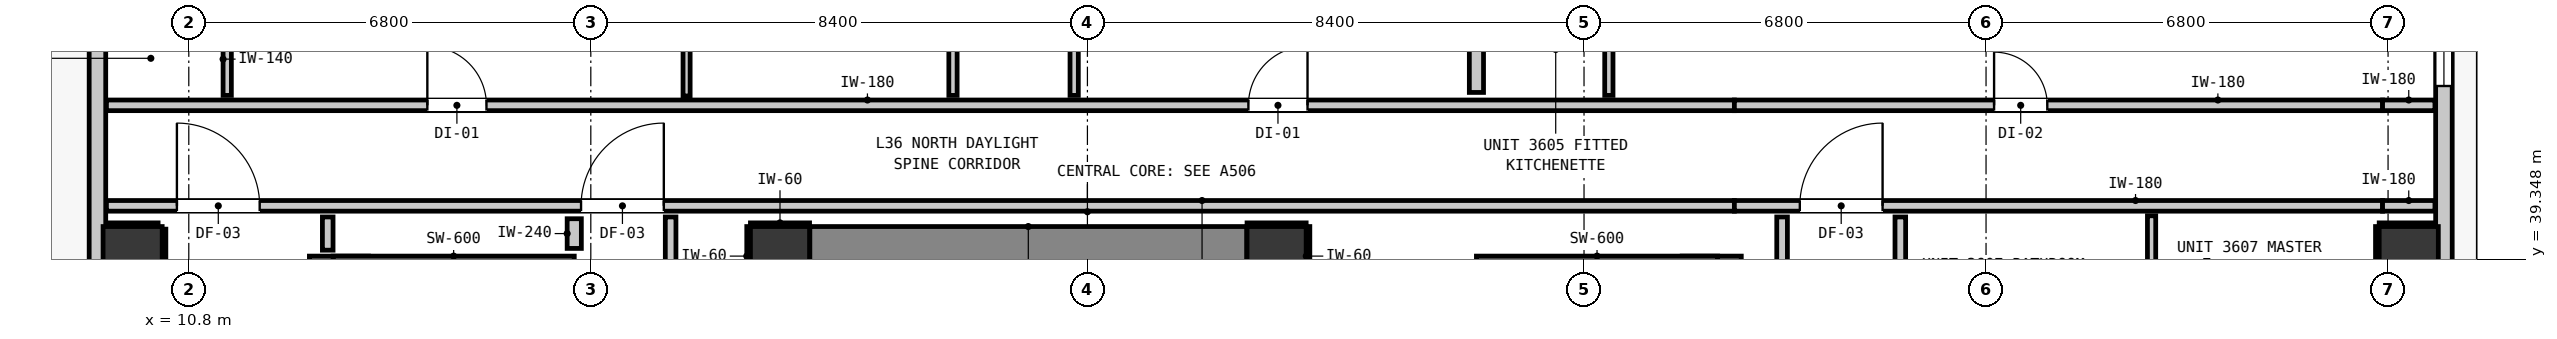
"""IFC4 building model, lengths in metres.
Left out: names, types, materials, properties, quantities, classifications, styles, units other than length and angle.
Written with IfcOpenShell. Run it as: python <this file> out.ifc"""

import sys

from ifc_helpers import new_model, si_unit, direction, frame, frame_2d, origin, origin_2d, place, context, subcontext, project, spatial, rectangle, extrude, element, fill, save


model = new_model("IFC4")
c1 = context("Model", 3, precision=1e-05, world=origin(), true_north=direction((0.0, 1.0)))
c2 = subcontext(c1, "Body", "Model", "MODEL_VIEW")
j1 = project(units=[si_unit("LENGTHUNIT", "METRE"), si_unit("PLANEANGLEUNIT", "RADIAN")], contexts=[c1])
p1 = place(None, origin())
s1 = spatial("IfcSite", under=j1, at=p1, CompositionType="ELEMENT")
p2 = place(p1, origin())
s2 = spatial("IfcBuilding", under=s1, at=p2, CompositionType="ELEMENT")
p3 = place(p2, frame((0.0, 0.0, 126.0)))
s3 = spatial("IfcBuildingStorey", under=s2, at=p3, CompositionType="ELEMENT", Elevation=126.0)
for number, where, z_axis, x_axis in (
    (1, (20.8, 39.4, 0.0), (0.0, 0.0, 1.0), (1.0, 0.0, 0.0)),
    (2, (29.2, 39.4, 0.0), (0.0, 0.0, 1.0), (1.0, 0.0, 0.0)),
):
    element("IfcColumn", number, at=place(p3, frame(where, z_axis=z_axis, x_axis=x_axis)), inside=s3, PredefinedType="COLUMN", context=c2, shape_type="SweptSolid", body=[
        extrude(rectangle(XDim=1.0, YDim=1.0, at=origin_2d()), origin(), (0.0, 0.0, 1.0), 3.32),
    ])
p4 = place(p3, frame((13.34, 31.205, 0.0), z_axis=(0.0, 0.0, 1.0), x_axis=(0.0, 1.0, 0.0)))
e3 = element("IfcWall", 3, at=p4, inside=s3, PredefinedType="SHEAR", context=c2, shape_type="SweptSolid", body=[
    extrude(rectangle(XDim=8.195, YDim=1.0, at=frame_2d((4.097, 0.0))), origin(), (0.0, 0.0, 1.0), 3.32),
])
p5 = place(p3, frame((13.24, 39.1, 0.0), z_axis=(0.0, 0.0, 1.0), x_axis=(1.0, 0.0, 0.0)))
e4 = element("IfcWall", 4, at=p5, inside=s3, PredefinedType="SHEAR", context=c2, shape_type="SweptSolid", body=[
    extrude(rectangle(XDim=4.08, YDim=0.6, at=frame_2d((2.04, 0.0))), origin(), (0.0, 0.0, 1.0), 3.32),
])
p6 = place(p3, frame((36.56, 31.205, 0.0), z_axis=(0.0, 0.0, 1.0), x_axis=(0.0, 1.0, 0.0)))
e5 = element("IfcWall", 5, at=p6, inside=s3, PredefinedType="SHEAR", context=c2, shape_type="SweptSolid", body=[
    extrude(rectangle(XDim=8.195, YDim=1.0, at=frame_2d((4.097, 0.0))), origin(), (0.0, 0.0, 1.0), 3.32),
])
p7 = place(p3, frame((32.58, 39.1, 0.0), z_axis=(0.0, 0.0, 1.0), x_axis=(1.0, 0.0, 0.0)))
e6 = element("IfcWall", 6, at=p7, inside=s3, PredefinedType="SHEAR", context=c2, shape_type="SweptSolid", body=[
    extrude(rectangle(XDim=4.08, YDim=0.6, at=frame_2d((2.04, 0.0))), origin(), (0.0, 0.0, 1.0), 3.32),
])
p8 = place(p3, frame((21.305, 39.4, 0.0), z_axis=(0.0, 0.0, 1.0), x_axis=(1.0, 0.0, 0.0)))
e7 = element("IfcWall", 7, at=p8, inside=s3, PredefinedType="SHEAR", context=c2, shape_type="SweptSolid", body=[
    extrude(rectangle(XDim=7.39, YDim=1.0, at=frame_2d((3.695, 0.0))), origin(), (0.0, 0.0, 1.0), 3.32),
])
for number, where, z_axis, x_axis in (
    (8, (9.85, 39.4, -0.2), (0.0, 0.0, 1.0), (1.0, 0.0, 0.0)),
    (9, (48.35, 39.4, -0.2), (0.0, 0.0, 1.0), (1.0, 0.0, 0.0)),
):
    element("IfcColumn", number, at=place(p3, frame(where, z_axis=z_axis, x_axis=x_axis)), inside=s3, PredefinedType="COLUMN", context=c2, shape_type="SweptSolid", body=[
        extrude(rectangle(XDim=1.0, YDim=1.0, at=origin_2d()), origin(), (0.0, 0.0, 1.0), 3.52),
    ])
p9 = place(p3, frame((9.255, 11.355, 0.0), z_axis=(0.0, 0.0, 1.0), x_axis=(0.0, 1.0, 0.0)))
e10 = element("IfcWall", 10, at=p9, inside=s3, PredefinedType="STANDARD", context=c2, shape_type="SweptSolid", body=[
    extrude(rectangle(XDim=32.29, YDim=0.28, at=frame_2d((16.145, 0.0))), origin(), (0.0, 0.0, 1.0), 3.08),
])
p10 = place(p9, frame((0.503, 0.0, 0.0)))
e11 = element("IfcOpeningElement", 11, at=p10, cuts=e10, PredefinedType="OPENING", context=c2, shape_type="SweptSolid", body=[
    extrude(rectangle(XDim=1.1, YDim=2.15, at=frame_2d((0.55, 1.075))), frame((0.0, 0.15, 0.0), z_axis=(0.0, -1.0, 0.0), x_axis=(1.0, 0.0, 0.0)), (0.0, 0.0, 1.0), 0.3),
])
p11 = place(p3, frame((48.945, 43.645, 0.0), z_axis=(0.0, 0.0, 1.0), x_axis=(0.0, -1.0, 0.0)))
e12 = element("IfcWall", 12, at=p11, inside=s3, PredefinedType="STANDARD", context=c2, shape_type="SweptSolid", body=[
    extrude(rectangle(XDim=32.29, YDim=0.28, at=frame_2d((16.145, 0.0))), origin(), (0.0, 0.0, 1.0), 3.08),
])
p12 = place(p11, frame((6.52, 0.0, 0.0)))
e13 = element("IfcOpeningElement", 13, at=p12, cuts=e12, PredefinedType="OPENING", context=c2, shape_type="SweptSolid", body=[
    extrude(rectangle(XDim=1.0, YDim=2.15, at=frame_2d((0.5, 1.075))), frame((0.0, 0.15, 0.0), z_axis=(0.0, -1.0, 0.0), x_axis=(1.0, 0.0, 0.0)), (0.0, 0.0, 1.0), 0.3),
])
p13 = place(p11, frame((0.318, 0.0, 0.85)))
e14 = element("IfcOpeningElement", 14, at=p13, cuts=e12, PredefinedType="OPENING", context=c2, shape_type="SweptSolid", body=[
    extrude(rectangle(XDim=1.05, YDim=1.65, at=frame_2d((0.525, 0.825))), frame((0.0, 0.15, 0.0), z_axis=(0.0, -1.0, 0.0), x_axis=(1.0, 0.0, 0.0)), (0.0, 0.0, 1.0), 0.3),
])
p14 = place(p11, frame((16.674, 0.0, 0.85)))
e15 = element("IfcOpeningElement", 15, at=p14, cuts=e12, PredefinedType="OPENING", context=c2, shape_type="SweptSolid", body=[
    extrude(rectangle(XDim=1.5, YDim=1.8, at=frame_2d((0.75, 0.9))), frame((0.0, 0.15, 0.0), z_axis=(0.0, -1.0, 0.0), x_axis=(1.0, 0.0, 0.0)), (0.0, 0.0, 1.0), 0.3),
])
p15 = place(p11, frame((13.773, 0.0, 0.85)))
e16 = element("IfcOpeningElement", 16, at=p15, cuts=e12, PredefinedType="OPENING", context=c2, shape_type="SweptSolid", body=[
    extrude(rectangle(XDim=1.05, YDim=1.65, at=frame_2d((0.525, 0.825))), frame((0.0, 0.15, 0.0), z_axis=(0.0, -1.0, 0.0), x_axis=(1.0, 0.0, 0.0)), (0.0, 0.0, 1.0), 0.3),
])
p16 = place(p11, frame((7.907, 0.0, 0.85)))
e17 = element("IfcOpeningElement", 17, at=p16, cuts=e12, PredefinedType="OPENING", context=c2, shape_type="SweptSolid", body=[
    extrude(rectangle(XDim=1.5, YDim=1.8, at=frame_2d((0.75, 0.9))), frame((0.0, 0.15, 0.0), z_axis=(0.0, -1.0, 0.0), x_axis=(1.0, 0.0, 0.0)), (0.0, 0.0, 1.0), 0.3),
])
p17 = place(p11, frame((5.043, 0.0, 0.85)))
e18 = element("IfcOpeningElement", 18, at=p17, cuts=e12, PredefinedType="OPENING", context=c2, shape_type="SweptSolid", body=[
    extrude(rectangle(XDim=0.58, YDim=1.5, at=frame_2d((0.29, 0.75))), frame((0.0, 0.15, 0.0), z_axis=(0.0, -1.0, 0.0), x_axis=(1.0, 0.0, 0.0)), (0.0, 0.0, 1.0), 0.3),
])
p18 = place(p3, frame((9.407, 40.25, 0.0), z_axis=(0.0, 0.0, 1.0), x_axis=(1.0, 0.0, 0.0)))
e19 = element("IfcWall", 19, at=p18, inside=s3, PredefinedType="PARTITIONING", context=c2, shape_type="SweptSolid", body=[
    extrude(rectangle(XDim=27.536, YDim=0.18, at=frame_2d((13.768, 0.0))), origin(), (0.0, 0.0, 1.0), 3.08),
])
p19 = place(p18, frame((8.028, 0.0, 0.0)))
e20 = element("IfcOpeningElement", 20, at=p19, cuts=e19, PredefinedType="OPENING", context=c2, shape_type="SweptSolid", body=[
    extrude(rectangle(XDim=1.4, YDim=2.15, at=frame_2d((0.7, 1.075))), frame((0.0, 0.1, 0.0), z_axis=(0.0, -1.0, 0.0), x_axis=(1.0, 0.0, 0.0)), (0.0, 0.0, 1.0), 0.2),
])
p20 = place(p18, frame((1.192, 0.0, 0.0)))
e21 = element("IfcOpeningElement", 21, at=p20, cuts=e19, PredefinedType="OPENING", context=c2, shape_type="SweptSolid", body=[
    extrude(rectangle(XDim=1.4, YDim=2.15, at=frame_2d((0.7, 1.075))), frame((0.0, 0.1, 0.0), z_axis=(0.0, -1.0, 0.0), x_axis=(1.0, 0.0, 0.0)), (0.0, 0.0, 1.0), 0.2),
])
p21 = place(p3, frame((36.943, 40.25, 0.0), z_axis=(0.0, 0.0, 1.0), x_axis=(1.0, 0.0, 0.0)))
e22 = element("IfcWall", 22, at=p21, inside=s3, PredefinedType="PARTITIONING", context=c2, shape_type="SweptSolid", body=[
    extrude(rectangle(XDim=10.964, YDim=0.18, at=frame_2d((5.482, 0.0))), origin(), (0.0, 0.0, 1.0), 2.565),
])
p22 = place(p21, frame((1.107, 0.0, 0.0)))
e23 = element("IfcOpeningElement", 23, at=p22, cuts=e22, PredefinedType="OPENING", context=c2, shape_type="SweptSolid", body=[
    extrude(rectangle(XDim=1.4, YDim=2.15, at=frame_2d((0.7, 1.075))), frame((0.0, 0.1, 0.0), z_axis=(0.0, -1.0, 0.0), x_axis=(1.0, 0.0, 0.0)), (0.0, 0.0, 1.0), 0.2),
])
p23 = place(p3, frame((47.907, 40.25, 0.0), z_axis=(0.0, 0.0, 1.0), x_axis=(1.0, 0.0, 0.0)))
e24 = element("IfcWall", 24, at=p23, inside=s3, PredefinedType="PARTITIONING", context=c2, shape_type="SweptSolid", body=[
    extrude(rectangle(XDim=0.886, YDim=0.18, at=frame_2d((0.443, 0.0))), origin(), (0.0, 0.0, 1.0), 3.08),
])
p24 = place(p3, frame((9.407, 41.95, 0.0), z_axis=(0.0, 0.0, 1.0), x_axis=(1.0, 0.0, 0.0)))
e25 = element("IfcWall", 25, at=p24, inside=s3, PredefinedType="PARTITIONING", context=c2, shape_type="SweptSolid", body=[
    extrude(rectangle(XDim=27.536, YDim=0.18, at=frame_2d((13.768, 0.0))), origin(), (0.0, 0.0, 1.0), 3.08),
])
p25 = place(p24, frame((5.428, 0.0, 0.0)))
e26 = element("IfcOpeningElement", 26, at=p25, cuts=e25, PredefinedType="OPENING", context=c2, shape_type="SweptSolid", body=[
    extrude(rectangle(XDim=1.0, YDim=2.15, at=frame_2d((0.5, 1.075))), frame((0.0, 0.1, 0.0), z_axis=(0.0, -1.0, 0.0), x_axis=(1.0, 0.0, 0.0)), (0.0, 0.0, 1.0), 0.2),
])
p26 = place(p24, frame((19.316, 0.0, 0.0)))
e27 = element("IfcOpeningElement", 27, at=p26, cuts=e25, PredefinedType="OPENING", context=c2, shape_type="SweptSolid", body=[
    extrude(rectangle(XDim=1.0, YDim=2.15, at=frame_2d((0.5, 1.075))), frame((0.0, 0.1, 0.0), z_axis=(0.0, -1.0, 0.0), x_axis=(1.0, 0.0, 0.0)), (0.0, 0.0, 1.0), 0.2),
])
p27 = place(p3, frame((36.943, 41.95, 0.0), z_axis=(0.0, 0.0, 1.0), x_axis=(1.0, 0.0, 0.0)))
e28 = element("IfcWall", 28, at=p27, inside=s3, PredefinedType="PARTITIONING", context=c2, shape_type="SweptSolid", body=[
    extrude(rectangle(XDim=10.964, YDim=0.18, at=frame_2d((5.482, 0.0))), origin(), (0.0, 0.0, 1.0), 2.565),
])
p28 = place(p27, frame((4.393, 0.0, 0.0)))
e29 = element("IfcOpeningElement", 29, at=p28, cuts=e28, PredefinedType="OPENING", context=c2, shape_type="SweptSolid", body=[
    extrude(rectangle(XDim=0.9, YDim=2.1, at=frame_2d((0.45, 1.05))), frame((0.0, 0.1, 0.0), z_axis=(0.0, -1.0, 0.0), x_axis=(1.0, 0.0, 0.0)), (0.0, 0.0, 1.0), 0.2),
])
p29 = place(p3, frame((47.907, 41.95, 0.0), z_axis=(0.0, 0.0, 1.0), x_axis=(1.0, 0.0, 0.0)))
e30 = element("IfcWall", 30, at=p29, inside=s3, PredefinedType="PARTITIONING", context=c2, shape_type="SweptSolid", body=[
    extrude(rectangle(XDim=0.886, YDim=0.18, at=frame_2d((0.443, 0.0))), origin(), (0.0, 0.0, 1.0), 3.08),
])
p30 = place(p3, frame((17.32, 39.53, 0.0), z_axis=(0.0, 0.0, 1.0), x_axis=(0.0, 1.0, 0.0)))
e31 = element("IfcWall", 31, at=p30, inside=s3, PredefinedType="PARTITIONING", context=c2, shape_type="SweptSolid", body=[
    extrude(rectangle(XDim=0.502, YDim=0.24, at=frame_2d((0.251, 0.0))), origin(), (0.0, 0.0, 1.0), 3.08),
])
p31 = place(p3, frame((32.58, 42.168, 0.0), z_axis=(0.0, 0.0, 1.0), x_axis=(0.0, 1.0, 0.0)))
e32 = element("IfcWall", 32, at=p31, inside=s3, PredefinedType="PARTITIONING", context=c2, shape_type="SweptSolid", body=[
    extrude(rectangle(XDim=3.625, YDim=0.24, at=frame_2d((1.812, 0.0))), origin(), (0.0, 0.0, 1.0), 3.08),
])
p32 = place(p31, frame((1.257, 0.0, 0.0)))
e33 = element("IfcOpeningElement", 33, at=p32, cuts=e32, PredefinedType="OPENING", context=c2, shape_type="SweptSolid", body=[
    extrude(rectangle(XDim=0.9, YDim=2.1, at=frame_2d((0.45, 1.05))), frame((0.0, 0.13, 0.0), z_axis=(0.0, -1.0, 0.0), x_axis=(1.0, 0.0, 0.0)), (0.0, 0.0, 1.0), 0.26),
])
p33 = place(p3, frame((13.15, 39.5, 0.0), z_axis=(0.0, 0.0, 1.0), x_axis=(0.0, 1.0, 0.0)))
e34 = element("IfcWall", 34, at=p33, inside=s3, PredefinedType="PARTITIONING", context=c2, shape_type="SweptSolid", body=[
    extrude(rectangle(XDim=0.562, YDim=0.18, at=frame_2d((0.281, 0.0))), origin(), (0.0, 0.0, 1.0), 2.315),
])
p34 = place(p3, frame((18.95, 39.058, 0.0), z_axis=(0.0, 0.0, 1.0), x_axis=(0.0, 1.0, 0.0)))
e35 = element("IfcWall", 35, at=p34, inside=s3, PredefinedType="PARTITIONING", context=c2, shape_type="SweptSolid", body=[
    extrude(rectangle(XDim=1.004, YDim=0.18, at=frame_2d((0.502, 0.0))), origin(), (0.0, 0.0, 1.0), 3.08),
])
p35 = place(p3, frame((37.75, 21.368, 0.0), z_axis=(0.0, 0.0, 1.0), x_axis=(0.0, 1.0, 0.0)))
e36 = element("IfcWall", 36, at=p35, inside=s3, PredefinedType="PARTITIONING", context=c2, shape_type="SweptSolid", body=[
    extrude(rectangle(XDim=18.694, YDim=0.18, at=frame_2d((9.347, 0.0))), origin(), (0.0, 0.0, 1.0), 3.08),
])
p36 = place(p3, frame((39.75, 37.793, 0.0), z_axis=(0.0, 0.0, 1.0), x_axis=(0.0, 1.0, 0.0)))
e37 = element("IfcWall", 37, at=p36, inside=s3, PredefinedType="PARTITIONING", context=c2, shape_type="SweptSolid", body=[
    extrude(rectangle(XDim=2.269, YDim=0.18, at=frame_2d((1.135, 0.0))), origin(), (0.0, 0.0, 1.0), 3.08),
])
p37 = place(p3, frame((11.45, 42.118, 0.0), z_axis=(0.0, 0.0, 1.0), x_axis=(0.0, 1.0, 0.0)))
e38 = element("IfcWall", 38, at=p37, inside=s3, PredefinedType="PARTITIONING", context=c2, shape_type="SweptSolid", body=[
    extrude(rectangle(XDim=2.808, YDim=0.14, at=frame_2d((1.404, 0.0))), origin(), (0.0, 0.0, 1.0), 2.565),
])
p38 = place(p37, frame((1.327, 0.0, 0.0)))
e39 = element("IfcOpeningElement", 39, at=p38, cuts=e38, PredefinedType="OPENING", context=c2, shape_type="SweptSolid", body=[
    extrude(rectangle(XDim=0.86, YDim=2.02, at=frame_2d((0.43, 1.01))), frame((0.0, 0.08, 0.0), z_axis=(0.0, -1.0, 0.0), x_axis=(1.0, 0.0, 0.0)), (0.0, 0.0, 1.0), 0.16),
])
p39 = place(p3, frame((23.726, 42.118, 0.0), z_axis=(0.0, 0.0, 1.0), x_axis=(0.0, 1.0, 0.0)))
e40 = element("IfcWall", 40, at=p39, inside=s3, PredefinedType="PARTITIONING", context=c2, shape_type="SweptSolid", body=[
    extrude(rectangle(XDim=3.675, YDim=0.14, at=frame_2d((1.837, 0.0))), origin(), (0.0, 0.0, 1.0), 3.08),
])
p40 = place(p3, frame((25.776, 42.118, 0.0), z_axis=(0.0, 0.0, 1.0), x_axis=(0.0, 1.0, 0.0)))
e41 = element("IfcWall", 41, at=p40, inside=s3, PredefinedType="PARTITIONING", context=c2, shape_type="SweptSolid", body=[
    extrude(rectangle(XDim=3.675, YDim=0.14, at=frame_2d((1.837, 0.0))), origin(), (0.0, 0.0, 1.0), 3.08),
])
p41 = place(p40, frame((1.327, 0.0, 0.0)))
e42 = element("IfcOpeningElement", 42, at=p41, cuts=e41, PredefinedType="OPENING", context=c2, shape_type="SweptSolid", body=[
    extrude(rectangle(XDim=0.86, YDim=2.02, at=frame_2d((0.43, 1.01))), frame((0.0, 0.08, 0.0), z_axis=(0.0, -1.0, 0.0), x_axis=(1.0, 0.0, 0.0)), (0.0, 0.0, 1.0), 0.16),
])
p42 = place(p3, frame((34.82, 42.118, 0.0), z_axis=(0.0, 0.0, 1.0), x_axis=(0.0, 1.0, 0.0)))
e43 = element("IfcWall", 43, at=p42, inside=s3, PredefinedType="PARTITIONING", context=c2, shape_type="SweptSolid", body=[
    extrude(rectangle(XDim=3.675, YDim=0.14, at=frame_2d((1.837, 0.0))), origin(), (0.0, 0.0, 1.0), 3.08),
])
p43 = place(p3, frame((44.0, 37.773, 0.0), z_axis=(0.0, 0.0, 1.0), x_axis=(0.0, 1.0, 0.0)))
e44 = element("IfcWall", 44, at=p43, inside=s3, PredefinedType="PARTITIONING", context=c2, shape_type="SweptSolid", body=[
    extrude(rectangle(XDim=2.309, YDim=0.14, at=frame_2d((1.155, 0.0))), origin(), (0.0, 0.0, 1.0), 3.08),
])
p44 = place(p3, frame((19.22, 42.108, 0.0), z_axis=(0.0, 0.0, 1.0), x_axis=(0.0, 1.0, 0.0)))
e45 = element("IfcWall", 45, at=p44, inside=s3, PredefinedType="PARTITIONING", context=c2, shape_type="SweptSolid", body=[
    extrude(rectangle(XDim=3.685, YDim=0.12, at=frame_2d((1.843, 0.0))), origin(), (0.0, 0.0, 1.0), 3.08),
])
p45 = place(p44, frame((1.317, 0.0, 0.0)))
e46 = element("IfcOpeningElement", 46, at=p45, cuts=e45, PredefinedType="OPENING", context=c2, shape_type="SweptSolid", body=[
    extrude(rectangle(XDim=0.9, YDim=2.1, at=frame_2d((0.45, 1.05))), frame((0.0, 0.07, 0.0), z_axis=(0.0, -1.0, 0.0), x_axis=(1.0, 0.0, 0.0)), (0.0, 0.0, 1.0), 0.14),
])
for number, where, z_axis, x_axis in (
    (47, (20.3, 39.932, 0.0), (0.0, 0.0, 1.0), (1.0, 0.0, 0.0)),
    (48, (20.268, 38.9, 0.0), (0.0, 0.0, 1.0), (0.0, 1.0, 0.0)),
    (49, (28.7, 39.932, 0.0), (0.0, 0.0, 1.0), (1.0, 0.0, 0.0)),
    (50, (29.732, 38.9, 0.0), (0.0, 0.0, 1.0), (0.0, 1.0, 0.0)),
):
    element("IfcWall", number, at=place(p3, frame(where, z_axis=z_axis, x_axis=x_axis)), inside=s3, PredefinedType="PARTITIONING", context=c2, shape_type="SweptSolid", body=[
        extrude(rectangle(XDim=1.0, YDim=0.06, at=frame_2d((0.5, 0.0))), origin(), (0.0, 0.0, 1.0), 1.45),
    ])
p46 = place(p3, frame((9.41, 39.932, 0.0), z_axis=(0.0, 0.0, 1.0), x_axis=(1.0, 0.0, 0.0)))
e51 = element("IfcWall", 51, at=p46, inside=s3, PredefinedType="PARTITIONING", context=c2, shape_type="SweptSolid", body=[
    extrude(rectangle(XDim=0.871, YDim=0.06, at=frame_2d((0.436, 0.0))), origin(), (0.0, 0.0, 1.0), 1.45),
])
p47 = place(p3, frame((10.382, 38.9, 0.0), z_axis=(0.0, 0.0, 1.0), x_axis=(0.0, 1.0, 0.0)))
e52 = element("IfcWall", 52, at=p47, inside=s3, PredefinedType="PARTITIONING", context=c2, shape_type="SweptSolid", body=[
    extrude(rectangle(XDim=0.956, YDim=0.06, at=frame_2d((0.478, 0.0))), origin(), (0.0, 0.0, 1.0), 1.45),
])
p48 = place(p3, frame((47.85, 39.932, 0.0), z_axis=(0.0, 0.0, 1.0), x_axis=(1.0, 0.0, 0.0)))
e53 = element("IfcWall", 53, at=p48, inside=s3, PredefinedType="PARTITIONING", context=c2, shape_type="SweptSolid", body=[
    extrude(rectangle(XDim=0.94, YDim=0.06, at=frame_2d((0.47, 0.0))), origin(), (0.0, 0.0, 1.0), 1.45),
])
p49 = place(p3, frame((47.818, 38.9, 0.0), z_axis=(0.0, 0.0, 1.0), x_axis=(0.0, 1.0, 0.0)))
e54 = element("IfcWall", 54, at=p49, inside=s3, PredefinedType="PARTITIONING", context=c2, shape_type="SweptSolid", body=[
    extrude(rectangle(XDim=1.0, YDim=0.06, at=frame_2d((0.5, 0.0))), origin(), (0.0, 0.0, 1.0), 1.45),
])
p50 = place(p13, origin())
e55 = element("IfcWindow", 55, at=p50, inside=s3, PartitioningType="SINGLE_PANEL", PredefinedType="WINDOW", context=c2, shape_type="SweptSolid", body=[
    extrude(rectangle(XDim=1.05, YDim=1.65, at=frame_2d((0.525, 0.825))), frame((0.0, 0.03, 0.0), z_axis=(0.0, -1.0, 0.0), x_axis=(1.0, 0.0, 0.0)), (0.0, 0.0, 1.0), 0.06),
])
fill(e14, e55)
p51 = place(p19, origin())
e56 = element("IfcDoor", 56, at=p51, inside=s3, OperationType="SINGLE_SWING_RIGHT", PredefinedType="DOOR", context=c2, shape_type="SweptSolid", body=[
    extrude(rectangle(XDim=1.4, YDim=2.15, at=frame_2d((0.7, 1.075))), frame((0.0, 0.025, 0.0), z_axis=(0.0, -1.0, 0.0), x_axis=(1.0, 0.0, 0.0)), (0.0, 0.0, 1.0), 0.05),
])
fill(e20, e56)
p52 = place(p20, origin())
e57 = element("IfcDoor", 57, at=p52, inside=s3, OperationType="SINGLE_SWING_LEFT", PredefinedType="DOOR", context=c2, shape_type="SweptSolid", body=[
    extrude(rectangle(XDim=1.4, YDim=2.15, at=frame_2d((0.7, 1.075))), frame((0.0, 0.025, 0.0), z_axis=(0.0, -1.0, 0.0), x_axis=(1.0, 0.0, 0.0)), (0.0, 0.0, 1.0), 0.05),
])
fill(e21, e57)
p53 = place(p22, origin())
e58 = element("IfcDoor", 58, at=p53, inside=s3, OperationType="SINGLE_SWING_RIGHT", PredefinedType="DOOR", context=c2, shape_type="SweptSolid", body=[
    extrude(rectangle(XDim=1.4, YDim=2.15, at=frame_2d((0.7, 1.075))), frame((0.0, 0.025, 0.0), z_axis=(0.0, -1.0, 0.0), x_axis=(1.0, 0.0, 0.0)), (0.0, 0.0, 1.0), 0.05),
])
fill(e23, e58)
p54 = place(p25, origin())
e59 = element("IfcDoor", 59, at=p54, inside=s3, OperationType="SINGLE_SWING_LEFT", PredefinedType="DOOR", context=c2, shape_type="SweptSolid", body=[
    extrude(rectangle(XDim=1.0, YDim=2.15, at=frame_2d((0.5, 1.075))), frame((0.0, 0.025, 0.0), z_axis=(0.0, -1.0, 0.0), x_axis=(1.0, 0.0, 0.0)), (0.0, 0.0, 1.0), 0.05),
])
fill(e26, e59)
p55 = place(p26, origin())
e60 = element("IfcDoor", 60, at=p55, inside=s3, OperationType="SINGLE_SWING_RIGHT", PredefinedType="DOOR", context=c2, shape_type="SweptSolid", body=[
    extrude(rectangle(XDim=1.0, YDim=2.15, at=frame_2d((0.5, 1.075))), frame((0.0, 0.025, 0.0), z_axis=(0.0, -1.0, 0.0), x_axis=(1.0, 0.0, 0.0)), (0.0, 0.0, 1.0), 0.05),
])
fill(e27, e60)
p56 = place(p28, origin())
e61 = element("IfcDoor", 61, at=p56, inside=s3, OperationType="SINGLE_SWING_LEFT", PredefinedType="DOOR", context=c2, shape_type="SweptSolid", body=[
    extrude(rectangle(XDim=0.9, YDim=2.1, at=frame_2d((0.45, 1.05))), frame((0.0, 0.025, 0.0), z_axis=(0.0, -1.0, 0.0), x_axis=(1.0, 0.0, 0.0)), (0.0, 0.0, 1.0), 0.05),
])
fill(e29, e61)
save(model, sys.argv[1])
